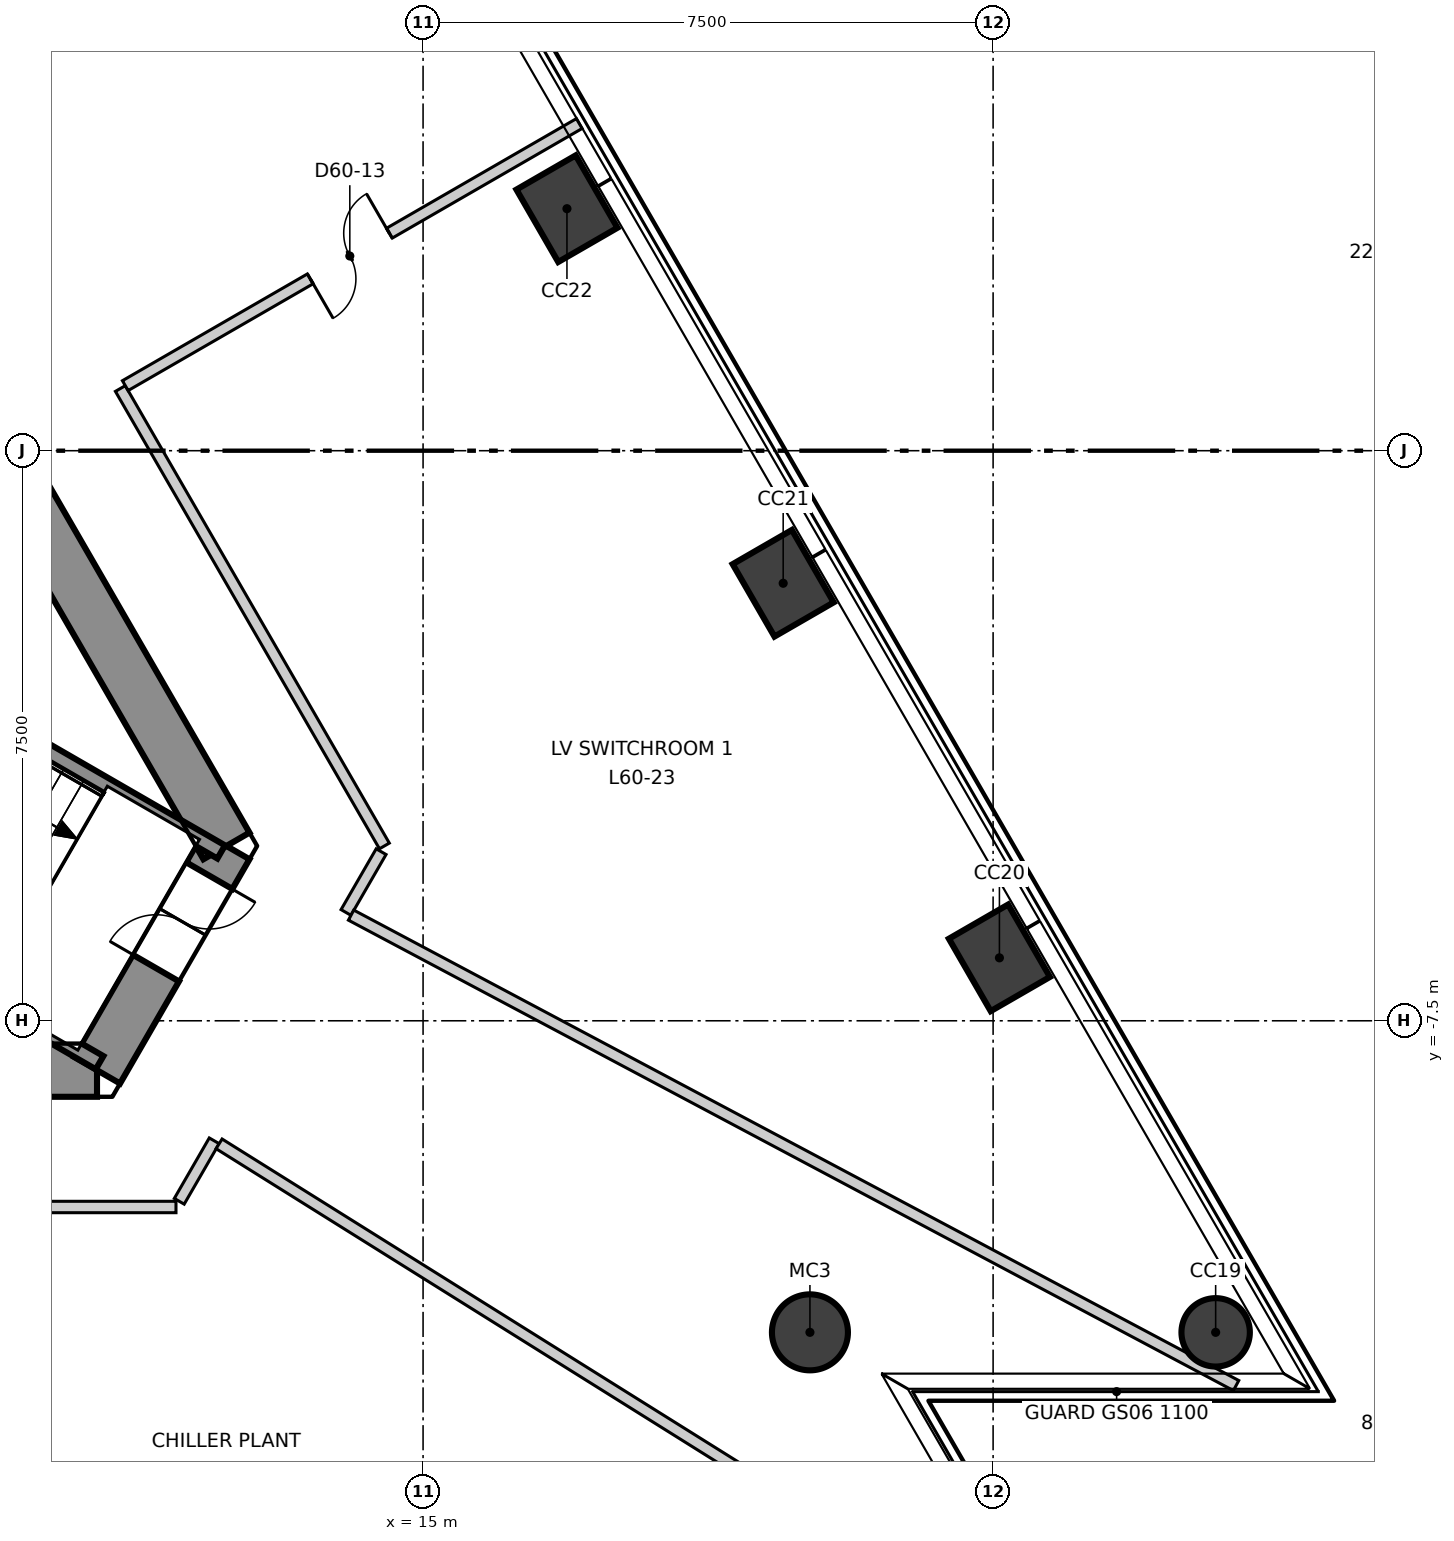
"""IFC4 building model, lengths in metres.
Left out: names, types, materials, properties, quantities, classifications, styles, units other than length and angle.
Written with IfcOpenShell. Run it as: python <this file> out.ifc"""

import sys

from ifc_helpers import new_model, si_unit, direction, frame, frame_2d, origin, origin_2d, place, context, subcontext, project, spatial, polyline, rectangle, circle, outline, extrude, element, fill, save


model = new_model("IFC4")
c1 = context("Model", 3, precision=1e-05, world=origin(), true_north=direction((0.0, 1.0)))
c2 = subcontext(c1, "Body", "Model", "MODEL_VIEW")
j1 = project(units=[si_unit("LENGTHUNIT", "METRE"), si_unit("PLANEANGLEUNIT", "RADIAN")], contexts=[c1])
p1 = place(None, origin())
s1 = spatial("IfcSite", under=j1, at=p1, CompositionType="ELEMENT")
p2 = place(p1, origin())
s2 = spatial("IfcBuilding", under=s1, at=p2, CompositionType="ELEMENT")
p3 = place(p2, frame((0.0, 0.0, 255.8)))
s3 = spatial("IfcBuildingStorey", under=s2, at=p3, CompositionType="ELEMENT", Elevation=255.8)
p4 = place(p3, frame((-10.71, -8.15, -0.6), z_axis=(0.0, 0.0, 1.0), x_axis=(1.0, 0.0, 0.0)))
e1 = element("IfcWall", 1, at=p4, inside=s3, PredefinedType="SHEAR", context=c2, shape_type="SweptSolid", body=[
    extrude(outline(polyline([(-0.202, -0.35), (1.782, -0.35), (3.766, -0.35), (5.75, -0.35), (7.734, -0.35), (9.718, -0.35), (11.702, -0.35), (13.686, -0.35), (15.67, -0.35), (17.654, -0.35), (19.638, -0.35), (21.622, -0.35), (21.218, 0.35), (19.307, 0.35), (17.397, 0.35), (15.486, 0.35), (13.576, 0.35), (11.665, 0.35), (9.755, 0.35), (7.844, 0.35), (5.934, 0.35), (4.023, 0.35), (2.113, 0.35), (0.202, 0.35), (-0.202, -0.35)])), origin(), (0.0, 0.0, 1.0), 6.3),
])
p5 = place(p4, frame((9.81, 0.0, 0.6)))
e2 = element("IfcOpeningElement", 2, at=p5, cuts=e1, PredefinedType="OPENING", context=c2, shape_type="SweptSolid", body=[
    extrude(rectangle(XDim=1.8, YDim=2.1, at=frame_2d((0.9, 1.05))), frame((0.0, 0.36, 0.0), z_axis=(0.0, -1.0, 0.0), x_axis=(1.0, 0.0, 0.0)), (0.0, 0.0, 1.0), 0.72),
])
p6 = place(p3, frame((10.71, -8.15, -0.6), z_axis=(0.0, 0.0, 1.0), x_axis=(0.49999337185, 0.866029230515, 0.0)))
e3 = element("IfcWall", 3, at=p6, inside=s3, PredefinedType="SHEAR", context=c2, shape_type="SweptSolid", body=[
    extrude(outline(polyline([(-0.202, -0.35), (1.703, -0.35), (3.608, -0.35), (3.204, 0.35), (1.703, 0.35), (0.202, 0.35), (-0.202, -0.35)])), origin(), (0.0, 0.0, 1.0), 6.3),
])
p7 = place(p6, frame((1.553, 0.0, 0.6)))
e4 = element("IfcOpeningElement", 4, at=p7, cuts=e3, PredefinedType="OPENING", context=c2, shape_type="SweptSolid", body=[
    extrude(rectangle(XDim=1.4, YDim=2.1, at=frame_2d((0.7, 1.05))), frame((0.0, 0.36, 0.0), z_axis=(0.0, -1.0, 0.0), x_axis=(1.0, 0.0, 0.0)), (0.0, 0.0, 1.0), 0.72),
])
p8 = place(p3, frame((12.413, -5.2, -0.6), z_axis=(0.0, 0.0, 1.0), x_axis=(-0.500011533395, 0.866018744874, 0.0)))
e5 = element("IfcWall", 5, at=p8, inside=s3, PredefinedType="SHEAR", context=c2, shape_type="SweptSolid", body=[
    extrude(outline(polyline([(-0.202, -0.35), (1.782, -0.35), (3.766, -0.35), (5.75, -0.35), (7.734, -0.35), (9.718, -0.35), (11.702, -0.35), (13.686, -0.35), (15.67, -0.35), (17.654, -0.35), (19.638, -0.35), (21.622, -0.35), (21.218, 0.35), (19.307, 0.35), (17.397, 0.35), (15.486, 0.35), (13.576, 0.35), (11.665, 0.35), (9.755, 0.35), (7.844, 0.35), (5.934, 0.35), (4.023, 0.35), (2.113, 0.35), (0.202, 0.35), (-0.202, -0.35)])), origin(), (0.0, 0.0, 1.0), 6.3),
])
p9 = place(p8, frame((16.465, 0.0, 0.6)))
e6 = element("IfcOpeningElement", 6, at=p9, cuts=e5, PredefinedType="OPENING", context=c2, shape_type="SweptSolid", body=[
    extrude(rectangle(XDim=0.9, YDim=2.1, at=frame_2d((0.45, 1.05))), frame((0.0, 0.36, 0.0), z_axis=(0.0, -1.0, 0.0), x_axis=(1.0, 0.0, 0.0)), (0.0, 0.0, 1.0), 0.72),
])
p10 = place(p3, frame((25.428, -11.599, -0.6), z_axis=(0.0, 0.0, 1.0), x_axis=(-0.5, 0.866025403784, 0.0)))
e7 = element("IfcColumn", 7, at=p10, inside=s3, PredefinedType="COLUMN", context=c2, shape_type="SweptSolid", body=[
    extrude(circle(Radius=0.45, at=origin_2d()), origin(), (0.0, 0.0, 1.0), 6.3),
])
for number, where, z_axis, x_axis in (
    (8, (22.583, -6.672, -0.6), (0.0, 0.0, 1.0), (-0.5, 0.866, 0.0)),
    (9, (19.738, -1.744, -0.6), (0.0, 0.0, 1.0), (-0.5, 0.866, 0.0)),
    (10, (16.893, 3.184, -0.6), (0.0, 0.0, 1.0), (-0.5, 0.866, 0.0)),
):
    element("IfcColumn", number, at=place(p3, frame(where, z_axis=z_axis, x_axis=x_axis)), inside=s3, PredefinedType="COLUMN", context=c2, shape_type="SweptSolid", body=[
        extrude(rectangle(XDim=1.1, YDim=0.9, at=origin_2d()), origin(), (0.0, 0.0, 1.0), 6.3),
    ])
p11 = place(p3, frame((20.09, -11.599, -0.6), z_axis=(0.0, 0.0, 1.0), x_axis=(1.0, 0.0, 0.0)))
e11 = element("IfcColumn", 11, at=p11, inside=s3, PredefinedType="COLUMN", context=c2, shape_type="SweptSolid", body=[
    extrude(circle(Radius=0.5, at=origin_2d()), origin(), (0.0, 0.0, 1.0), 6.3),
])
p12 = place(p3, frame((4.8, -9.95, 0.0), z_axis=(0.0, 0.0, 1.0), x_axis=(1.0, 0.0, 0.0)))
e12 = element("IfcWall", 12, at=p12, inside=s3, PredefinedType="PARTITIONING", context=c2, shape_type="SweptSolid", body=[
    extrude(rectangle(XDim=6.949, YDim=0.15, at=frame_2d((3.475, 0.0))), origin(), (0.0, 0.0, 1.0), 5.7),
])
p13 = place(p12, frame((2.875, 0.0, 0.0)))
e13 = element("IfcOpeningElement", 13, at=p13, cuts=e12, PredefinedType="OPENING", context=c2, shape_type="SweptSolid", body=[
    extrude(rectangle(XDim=1.2, YDim=2.1, at=frame_2d((0.6, 1.05))), frame((0.0, 0.085, 0.0), z_axis=(0.0, -1.0, 0.0), x_axis=(1.0, 0.0, 0.0)), (0.0, 0.0, 1.0), 0.17),
])
p14 = place(p3, frame((11.017, 0.818, 0.0), z_axis=(0.0, 0.0, 1.0), x_axis=(0.499929268946, -0.866066236526, 0.0)))
e14 = element("IfcWall", 14, at=p14, inside=s3, PredefinedType="PARTITIONING", context=c2, shape_type="SweptSolid", body=[
    extrude(rectangle(XDim=6.949, YDim=0.15, at=frame_2d((3.474, 0.0))), origin(), (0.0, 0.0, 1.0), 5.7),
])
p15 = place(p3, frame((11.792, -9.875, 0.0), z_axis=(0.0, 0.0, 1.0), x_axis=(0.500366091518, 0.865813937552, 0.0)))
e15 = element("IfcWall", 15, at=p15, inside=s3, PredefinedType="PARTITIONING", context=c2, shape_type="SweptSolid", body=[
    extrude(rectangle(XDim=0.919, YDim=0.15, at=frame_2d((0.459, 0.0))), origin(), (0.0, 0.0, 1.0), 5.7),
])
p16 = place(p3, frame((13.986, -6.075, 0.0), z_axis=(0.0, 0.0, 1.0), x_axis=(0.500004591975, 0.86602275259, 0.0)))
e16 = element("IfcWall", 16, at=p16, inside=s3, PredefinedType="PARTITIONING", context=c2, shape_type="SweptSolid", body=[
    extrude(rectangle(XDim=0.924, YDim=0.15, at=frame_2d((0.462, 0.0))), origin(), (0.0, 0.0, 1.0), 5.7),
])
p17 = place(p3, frame((12.316, -9.119, 0.0), z_axis=(0.0, 0.0, 1.0), x_axis=(0.847776956151, -0.53035293213, 0.0)))
e17 = element("IfcWall", 17, at=p17, inside=s3, PredefinedType="PARTITIONING", context=c2, shape_type="SweptSolid", body=[
    extrude(rectangle(XDim=13.203, YDim=0.15, at=frame_2d((6.602, 0.0))), origin(), (0.0, 0.0, 1.0), 5.1),
])
p18 = place(p3, frame((14.053, -6.11, 0.0), z_axis=(0.0, 0.0, 1.0), x_axis=(0.883019336408, -0.469336607916, 0.0)))
e18 = element("IfcWall", 18, at=p18, inside=s3, PredefinedType="PARTITIONING", context=c2, shape_type="SweptSolid", body=[
    extrude(rectangle(XDim=13.187, YDim=0.15, at=frame_2d((6.593, 0.0))), origin(), (0.0, 0.0, 1.0), 5.1),
])
p19 = place(p3, frame((11.082, 0.856, 0.0), z_axis=(0.0, 0.0, 1.0), x_axis=(0.866054133163, 0.499950235956, 0.0)))
e19 = element("IfcWall", 19, at=p19, inside=s3, PredefinedType="PARTITIONING", context=c2, shape_type="SweptSolid", body=[
    extrude(rectangle(XDim=6.897, YDim=0.15, at=frame_2d((3.448, 0.0))), origin(), (0.0, 0.0, 1.0), 5.7),
])
p20 = place(p19, frame((2.811, 0.0, 0.0)))
e20 = element("IfcOpeningElement", 20, at=p20, cuts=e19, PredefinedType="OPENING", context=c2, shape_type="SweptSolid", body=[
    extrude(rectangle(XDim=1.2, YDim=2.1, at=frame_2d((0.6, 1.05))), frame((0.0, 0.085, 0.0), z_axis=(0.0, -1.0, 0.0), x_axis=(1.0, 0.0, 0.0)), (0.0, 0.0, 1.0), 0.17),
])
p21 = place(p3, frame((4.929, -4.693, 0.0), z_axis=(0.0, 0.0, 1.0), x_axis=(0.865983344943, -0.500072840975, 0.0)))
e21 = element("IfcWall", 21, at=p21, inside=s3, PredefinedType="SOLIDWALL", context=c2, shape_type="SweptSolid", body=[
    extrude(rectangle(XDim=6.715, YDim=0.2, at=frame_2d((3.357, 0.0))), origin(), (0.0, 0.0, 1.0), 5.7),
])
p22 = place(p3, frame((6.529, -1.922, 0.0), z_axis=(0.0, 0.0, 1.0), x_axis=(0.866046323291, -0.499963764601, 0.0)))
e22 = element("IfcWall", 22, at=p22, inside=s3, PredefinedType="SOLIDWALL", context=c2, shape_type="SweptSolid", body=[
    extrude(rectangle(XDim=6.714, YDim=0.2, at=frame_2d((3.357, 0.0))), origin(), (0.0, 0.0, 1.0), 5.7),
])
p23 = place(p20, origin())
e23 = element("IfcDoor", 23, at=p23, inside=s3, OperationType="DOUBLE_DOOR_SINGLE_SWING", PredefinedType="DOOR", context=c2, shape_type="SweptSolid", body=[
    extrude(rectangle(XDim=1.2, YDim=2.1, at=frame_2d((0.6, 1.05))), frame((0.0, 0.025, 0.0), z_axis=(0.0, -1.0, 0.0), x_axis=(1.0, 0.0, 0.0)), (0.0, 0.0, 1.0), 0.05),
])
fill(e20, e23)
p24 = place(p7, origin())
e24 = element("IfcDoor", 24, at=p24, inside=s3, OperationType="DOUBLE_DOOR_SINGLE_SWING", PredefinedType="DOOR", context=c2, shape_type="SweptSolid", body=[
    extrude(rectangle(XDim=1.4, YDim=2.1, at=frame_2d((0.7, 1.05))), frame((0.0, 0.025, 0.0), z_axis=(0.0, -1.0, 0.0), x_axis=(1.0, 0.0, 0.0)), (0.0, 0.0, 1.0), 0.05),
])
fill(e4, e24)
save(model, sys.argv[1])
